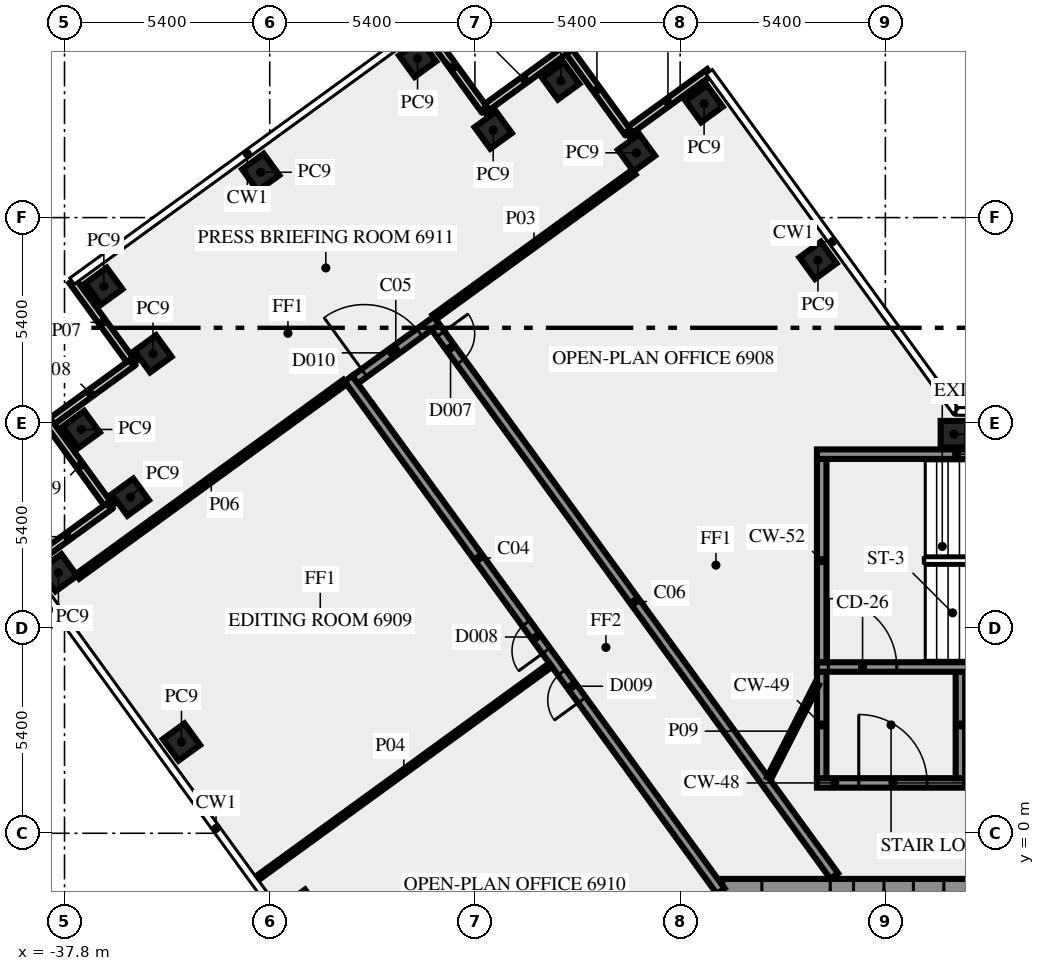
"""IFC4 building model, lengths in metres.
Left out: names, types, materials, properties, quantities, classifications, styles, units other than length and angle.
Written with IfcOpenShell. Run it as: python <this file> out.ifc"""

import sys

from ifc_helpers import new_model, si_unit, direction, frame, frame_2d, origin, origin_2d, place, context, subcontext, project, spatial, rectangle, extrude, element, fill, save


model = new_model("IFC4")
c1 = context("Model", 3, precision=1e-05, world=origin(), true_north=direction((0.0, 1.0)))
c2 = subcontext(c1, "Body", "Model", "MODEL_VIEW")
j1 = project(units=[si_unit("LENGTHUNIT", "METRE"), si_unit("PLANEANGLEUNIT", "RADIAN")], contexts=[c1])
p1 = place(None, origin())
s1 = spatial("IfcSite", under=j1, at=p1, CompositionType="ELEMENT")
p2 = place(p1, origin())
s2 = spatial("IfcBuilding", under=s1, at=p2, CompositionType="ELEMENT")
p3 = place(p2, frame((0.0, 0.0, 297.0)))
s3 = spatial("IfcBuildingStorey", under=s2, at=p3, CompositionType="ELEMENT", Elevation=297.0)
for number, where, z_axis, x_axis in (
    (1, (-17.974, 15.075, 0.0), (0.0, 0.0, 1.0), (-0.588, 0.809, 0.0)),
    (2, (-20.97, 19.195, 0.0), (0.0, 0.0, 1.0), (-0.588, 0.809, 0.0)),
    (3, (-22.749, 17.904, 0.0), (0.0, 0.0, 1.0), (-0.588, 0.809, 0.0)),
    (4, (-24.74, 19.795, 0.0), (0.0, 0.0, 1.0), (-0.588, 0.809, 0.0)),
    (5, (-26.519, 18.5, 0.0), (0.0, 0.0, 1.0), (-0.588, 0.809, 0.0)),
    (6, (-28.51, 20.39, 0.0), (0.0, 0.0, 1.0), (-0.809, -0.588, 0.0)),
    (7, (-32.637, 17.393, 0.0), (0.0, 0.0, 1.0), (-0.809, -0.588, 0.0)),
    (8, (-36.765, 14.395, 0.0), (0.0, 0.0, 1.0), (0.588, -0.809, 0.0)),
    (9, (-35.471, 12.616, 0.0), (0.0, 0.0, 1.0), (-0.809, -0.588, 0.0)),
    (10, (-37.36, 10.625, 0.0), (0.0, 0.0, 1.0), (0.588, -0.809, 0.0)),
    (11, (-36.068, 8.844, 0.0), (0.0, 0.0, 1.0), (0.588, -0.809, 0.0)),
    (12, (-37.96, 6.855, 0.0), (0.0, 0.0, 1.0), (0.588, -0.809, 0.0)),
    (13, (-34.722, 2.4, 0.0), (0.0, 0.0, 1.0), (0.588, -0.809, 0.0)),
    (14, (-31.548, -1.969, 0.0), (0.0, 0.0, 1.0), (0.588, -0.809, 0.0)),
    (15, (-14.395, 10.5, 0.0), (0.0, 0.0, 1.0), (-1.0, 0.0, 0.0)),
):
    element("IfcColumn", number, at=place(p3, frame(where, z_axis=z_axis, x_axis=x_axis)), inside=s3, PredefinedType="COLUMN", context=c2, shape_type="SweptSolid", body=[
        extrude(rectangle(XDim=0.7, YDim=0.7, at=origin_2d()), origin(), (0.0, 0.0, 1.0), 3.4),
    ])
for number, where, z_axis, x_axis in (
    (16, (-20.829, 20.025, 0.0), (0.0, 0.0, 1.0), (-0.809, -0.588, 0.0)),
    (17, (-22.996, 18.466, 0.0), (0.0, 0.0, 1.0), (-0.588, 0.809, 0.0)),
):
    element("IfcWall", number, at=place(p3, frame(where, z_axis=z_axis, x_axis=x_axis)), inside=s3, PredefinedType="SOLIDWALL", context=c2, shape_type="SweptSolid", body=[
        extrude(rectangle(XDim=2.7, YDim=0.2, at=frame_2d((1.35, 0.0))), origin(), (0.0, 0.0, 1.0), 3.4),
    ])
for number, where, z_axis, x_axis in (
    (18, (-24.6, 20.623, 0.0), (0.0, 0.0, 1.0), (-0.809, -0.588, 0.0)),
    (19, (-26.768, 19.063, 0.0), (0.0, 0.0, 1.0), (-0.588, 0.809, 0.0)),
):
    element("IfcWall", number, at=place(p3, frame(where, z_axis=z_axis, x_axis=x_axis)), inside=s3, PredefinedType="SOLIDWALL", context=c2, shape_type="SweptSolid", body=[
        extrude(rectangle(XDim=2.7, YDim=0.2, at=frame_2d((1.35, 0.0))), origin(), (0.0, 0.0, 1.0), 3.4),
    ])
for number, where, z_axis, x_axis in (
    (20, (-37.592, 14.536, 0.0), (0.0, 0.0, 1.0), (0.588, -0.809, 0.0)),
    (21, (-36.032, 12.369, 0.0), (0.0, 0.0, 1.0), (-0.809, -0.588, 0.0)),
    (22, (-38.189, 10.765, 0.0), (0.0, 0.0, 1.0), (0.588, -0.809, 0.0)),
    (23, (-36.629, 8.597, 0.0), (0.0, 0.0, 1.0), (-0.809, -0.588, 0.0)),
):
    element("IfcWall", number, at=place(p3, frame(where, z_axis=z_axis, x_axis=x_axis)), inside=s3, PredefinedType="SOLIDWALL", context=c2, shape_type="SweptSolid", body=[
        extrude(rectangle(XDim=2.7, YDim=0.2, at=frame_2d((1.35, 0.0))), origin(), (0.0, 0.0, 1.0), 3.4),
    ])
p4 = place(p3, frame((20.49, -1.45, 0.0), z_axis=(0.0, 0.0, 1.0), x_axis=(-1.0, 0.0, 0.0)))
e24 = element("IfcWall", 24, at=p4, inside=s3, PredefinedType="SHEAR", context=c2, shape_type="SweptSolid", body=[
    extrude(rectangle(XDim=40.98, YDim=0.5, at=frame_2d((20.49, 0.0))), origin(), (0.0, 0.0, 1.0), 3.4),
])
p5 = place(p4, frame((38.14, 0.0, 0.0)))
e25 = element("IfcOpeningElement", 25, at=p5, cuts=e24, PredefinedType="OPENING", context=c2, shape_type="SweptSolid", body=[
    extrude(rectangle(XDim=1.8, YDim=2.1, at=frame_2d((0.9, 1.05))), frame((0.0, 0.26, 0.0), z_axis=(0.0, -1.0, 0.0), x_axis=(1.0, 0.0, 0.0)), (0.0, 0.0, 1.0), 0.52),
])
p6 = place(p4, frame((36.728, 0.0, 0.0)))
e26 = element("IfcOpeningElement", 26, at=p6, cuts=e24, PredefinedType="OPENING", context=c2, shape_type="SweptSolid", body=[
    extrude(rectangle(XDim=0.8, YDim=2.1, at=frame_2d((0.4, 1.05))), frame((0.0, 0.26, 0.0), z_axis=(0.0, -1.0, 0.0), x_axis=(1.0, 0.0, 0.0)), (0.0, 0.0, 1.0), 0.52),
])
p7 = place(p4, frame((35.153, 0.0, 0.0)))
e27 = element("IfcOpeningElement", 27, at=p7, cuts=e24, PredefinedType="OPENING", context=c2, shape_type="SweptSolid", body=[
    extrude(rectangle(XDim=0.8, YDim=2.1, at=frame_2d((0.4, 1.05))), frame((0.0, 0.26, 0.0), z_axis=(0.0, -1.0, 0.0), x_axis=(1.0, 0.0, 0.0)), (0.0, 0.0, 1.0), 0.52),
])
p8 = place(p4, frame((32.94, 0.0, 0.0)))
e28 = element("IfcOpeningElement", 28, at=p8, cuts=e24, PredefinedType="OPENING", context=c2, shape_type="SweptSolid", body=[
    extrude(rectangle(XDim=0.9, YDim=2.1, at=frame_2d((0.45, 1.05))), frame((0.0, 0.26, 0.0), z_axis=(0.0, -1.0, 0.0), x_axis=(1.0, 0.0, 0.0)), (0.0, 0.0, 1.0), 0.52),
])
p9 = place(p4, frame((31.015, 0.0, 0.0)))
e29 = element("IfcOpeningElement", 29, at=p9, cuts=e24, PredefinedType="OPENING", context=c2, shape_type="SweptSolid", body=[
    extrude(rectangle(XDim=0.8, YDim=2.1, at=frame_2d((0.4, 1.05))), frame((0.0, 0.26, 0.0), z_axis=(0.0, -1.0, 0.0), x_axis=(1.0, 0.0, 0.0)), (0.0, 0.0, 1.0), 0.52),
])
p10 = place(p4, frame((24.765, 0.0, 0.0)))
e30 = element("IfcOpeningElement", 30, at=p10, cuts=e24, PredefinedType="OPENING", context=c2, shape_type="SweptSolid", body=[
    extrude(rectangle(XDim=0.8, YDim=2.1, at=frame_2d((0.4, 1.05))), frame((0.0, 0.26, 0.0), z_axis=(0.0, -1.0, 0.0), x_axis=(1.0, 0.0, 0.0)), (0.0, 0.0, 1.0), 0.52),
])
p11 = place(p4, frame((19.59, 0.0, 0.0)))
e31 = element("IfcOpeningElement", 31, at=p11, cuts=e24, PredefinedType="OPENING", context=c2, shape_type="SweptSolid", body=[
    extrude(rectangle(XDim=2.0, YDim=2.1, at=frame_2d((1.0, 1.05))), frame((0.0, 0.26, 0.0), z_axis=(0.0, -1.0, 0.0), x_axis=(1.0, 0.0, 0.0)), (0.0, 0.0, 1.0), 0.52),
])
p12 = place(p4, frame((14.202, 0.0, 0.0)))
e32 = element("IfcOpeningElement", 32, at=p12, cuts=e24, PredefinedType="OPENING", context=c2, shape_type="SweptSolid", body=[
    extrude(rectangle(XDim=0.9, YDim=2.1, at=frame_2d((0.45, 1.05))), frame((0.0, 0.26, 0.0), z_axis=(0.0, -1.0, 0.0), x_axis=(1.0, 0.0, 0.0)), (0.0, 0.0, 1.0), 0.52),
])
p13 = place(p4, frame((10.478, 0.0, 0.0)))
e33 = element("IfcOpeningElement", 33, at=p13, cuts=e24, PredefinedType="OPENING", context=c2, shape_type="SweptSolid", body=[
    extrude(rectangle(XDim=0.9, YDim=2.1, at=frame_2d((0.45, 1.05))), frame((0.0, 0.26, 0.0), z_axis=(0.0, -1.0, 0.0), x_axis=(1.0, 0.0, 0.0)), (0.0, 0.0, 1.0), 0.52),
])
p14 = place(p4, frame((7.14, 0.0, 0.0)))
e34 = element("IfcOpeningElement", 34, at=p14, cuts=e24, PredefinedType="OPENING", context=c2, shape_type="SweptSolid", body=[
    extrude(rectangle(XDim=0.9, YDim=2.1, at=frame_2d((0.45, 1.05))), frame((0.0, 0.26, 0.0), z_axis=(0.0, -1.0, 0.0), x_axis=(1.0, 0.0, 0.0)), (0.0, 0.0, 1.0), 0.52),
])
p15 = place(p4, frame((4.19, 0.0, 0.0)))
e35 = element("IfcOpeningElement", 35, at=p15, cuts=e24, PredefinedType="OPENING", context=c2, shape_type="SweptSolid", body=[
    extrude(rectangle(XDim=0.9, YDim=2.1, at=frame_2d((0.45, 1.05))), frame((0.0, 0.26, 0.0), z_axis=(0.0, -1.0, 0.0), x_axis=(1.0, 0.0, 0.0)), (0.0, 0.0, 1.0), 0.52),
])
p16 = place(p4, frame((1.04, 0.0, 0.0)))
e36 = element("IfcOpeningElement", 36, at=p16, cuts=e24, PredefinedType="OPENING", context=c2, shape_type="SweptSolid", body=[
    extrude(rectangle(XDim=1.8, YDim=2.1, at=frame_2d((0.9, 1.05))), frame((0.0, 0.26, 0.0), z_axis=(0.0, -1.0, 0.0), x_axis=(1.0, 0.0, 0.0)), (0.0, 0.0, 1.0), 0.52),
])
p17 = place(p3, frame((-18.0, 1.325, 0.0), z_axis=(0.0, 0.0, 1.0), x_axis=(1.0, 0.0, 0.0)))
e37 = element("IfcWall", 37, at=p17, inside=s3, PredefinedType="SHEAR", context=c2, shape_type="SweptSolid", body=[
    extrude(rectangle(XDim=3.9, YDim=0.25, at=frame_2d((1.95, 0.0))), origin(), (0.0, 0.0, 1.0), 3.4),
])
p18 = place(p17, frame((1.1, 0.0, 0.0)))
e38 = element("IfcOpeningElement", 38, at=p18, cuts=e37, PredefinedType="OPENING", context=c2, shape_type="SweptSolid", body=[
    extrude(rectangle(XDim=1.8, YDim=2.1, at=frame_2d((0.9, 1.05))), frame((0.0, 0.135, 0.0), z_axis=(0.0, -1.0, 0.0), x_axis=(1.0, 0.0, 0.0)), (0.0, 0.0, 1.0), 0.27),
])
for number, where, z_axis, x_axis in (
    (39, (-17.875, 1.45, 0.0), (0.0, 0.0, 1.0), (0.0, 1.0, 0.0)),
    (40, (-14.225, 1.45, 0.0), (0.0, 0.0, 1.0), (0.0, 1.0, 0.0)),
):
    element("IfcWall", number, at=place(p3, frame(where, z_axis=z_axis, x_axis=x_axis)), inside=s3, PredefinedType="SHEAR", context=c2, shape_type="SweptSolid", body=[
        extrude(rectangle(XDim=2.8, YDim=0.25, at=frame_2d((1.4, 0.0))), origin(), (0.0, 0.0, 1.0), 3.4),
    ])
p19 = place(p3, frame((-18.0, 4.375, 0.0), z_axis=(0.0, 0.0, 1.0), x_axis=(1.0, 0.0, 0.0)))
e41 = element("IfcWall", 41, at=p19, inside=s3, PredefinedType="SHEAR", context=c2, shape_type="SweptSolid", body=[
    extrude(rectangle(XDim=10.5, YDim=0.25, at=frame_2d((5.25, 0.0))), origin(), (0.0, 0.0, 1.0), 3.4),
])
p20 = place(p19, frame((0.3, 0.0, 0.0)))
e42 = element("IfcOpeningElement", 42, at=p20, cuts=e41, PredefinedType="OPENING", context=c2, shape_type="SweptSolid", body=[
    extrude(rectangle(XDim=1.8, YDim=2.1, at=frame_2d((0.9, 1.05))), frame((0.0, 0.135, 0.0), z_axis=(0.0, -1.0, 0.0), x_axis=(1.0, 0.0, 0.0)), (0.0, 0.0, 1.0), 0.27),
])
p21 = place(p3, frame((-17.875, 4.5, 0.0), z_axis=(0.0, 0.0, 1.0), x_axis=(0.0, 1.0, 0.0)))
e43 = element("IfcWall", 43, at=p21, inside=s3, PredefinedType="SHEAR", context=c2, shape_type="SweptSolid", body=[
    extrude(rectangle(XDim=5.35, YDim=0.25, at=frame_2d((2.675, 0.0))), origin(), (0.0, 0.0, 1.0), 3.4),
])
p22 = place(p3, frame((-18.0, 9.975, 0.0), z_axis=(0.0, 0.0, 1.0), x_axis=(1.0, 0.0, 0.0)))
e44 = element("IfcWall", 44, at=p22, inside=s3, PredefinedType="SHEAR", context=c2, shape_type="SweptSolid", body=[
    extrude(rectangle(XDim=10.5, YDim=0.25, at=frame_2d((5.25, 0.0))), origin(), (0.0, 0.0, 1.0), 3.4),
])
p23 = place(p22, frame((4.5, 0.0, 1.0)))
e45 = element("IfcOpeningElement", 45, at=p23, cuts=e44, PredefinedType="OPENING", context=c2, shape_type="SweptSolid", body=[
    extrude(rectangle(XDim=1.2, YDim=1.2, at=frame_2d((0.6, 0.6))), frame((0.0, 0.135, 0.0), z_axis=(0.0, -1.0, 0.0), x_axis=(1.0, 0.0, 0.0)), (0.0, 0.0, 1.0), 0.27),
])
p24 = place(p3, frame((-20.531, -1.523, 0.0), z_axis=(0.0, 0.0, 1.0), x_axis=(-0.587785867777, 0.809016547199, 0.0)))
e46 = element("IfcWall", 46, at=p24, inside=s3, PredefinedType="SOLIDWALL", context=c2, shape_type="SweptSolid", body=[
    extrude(rectangle(XDim=16.67, YDim=0.25, at=frame_2d((8.335, 0.0))), origin(), (0.0, 0.0, 1.0), 3.4),
])
p25 = place(p24, frame((6.216, 0.0, 0.0)))
e47 = element("IfcOpeningElement", 47, at=p25, cuts=e46, PredefinedType="OPENING", context=c2, shape_type="SweptSolid", body=[
    extrude(rectangle(XDim=0.9, YDim=2.1, at=frame_2d((0.45, 1.05))), frame((0.0, 0.135, 0.0), z_axis=(0.0, -1.0, 0.0), x_axis=(1.0, 0.0, 0.0)), (0.0, 0.0, 1.0), 0.27),
])
p26 = place(p24, frame((7.816, 0.0, 0.0)))
e48 = element("IfcOpeningElement", 48, at=p26, cuts=e46, PredefinedType="OPENING", context=c2, shape_type="SweptSolid", body=[
    extrude(rectangle(XDim=0.9, YDim=2.1, at=frame_2d((0.45, 1.05))), frame((0.0, 0.135, 0.0), z_axis=(0.0, -1.0, 0.0), x_axis=(1.0, 0.0, 0.0)), (0.0, 0.0, 1.0), 0.27),
])
p27 = place(p3, frame((-30.155, 11.936, 0.0), z_axis=(0.0, 0.0, 1.0), x_axis=(0.809038743598, 0.587755315891, 0.0)))
e49 = element("IfcWall", 49, at=p27, inside=s3, PredefinedType="SOLIDWALL", context=c2, shape_type="SweptSolid", body=[
    extrude(rectangle(XDim=2.65, YDim=0.25, at=frame_2d((1.325, 0.0))), origin(), (0.0, 0.0, 1.0), 3.4),
])
p28 = place(p27, frame((0.3, 0.0, 0.0)))
e50 = element("IfcOpeningElement", 50, at=p28, cuts=e49, PredefinedType="OPENING", context=c2, shape_type="SweptSolid", body=[
    extrude(rectangle(XDim=1.8, YDim=2.1, at=frame_2d((0.9, 1.05))), frame((0.0, 0.135, 0.0), z_axis=(0.0, -1.0, 0.0), x_axis=(1.0, 0.0, 0.0)), (0.0, 0.0, 1.0), 0.27),
])
p29 = place(p3, frame((-28.039, 13.319, 0.0), z_axis=(0.0, 0.0, 1.0), x_axis=(0.587791911753, -0.809012155952, 0.0)))
e51 = element("IfcWall", 51, at=p29, inside=s3, PredefinedType="SOLIDWALL", context=c2, shape_type="SweptSolid", body=[
    extrude(rectangle(XDim=17.853, YDim=0.25, at=frame_2d((8.927, 0.0))), origin(), (0.0, 0.0, 1.0), 3.4),
])
p30 = place(p29, frame((0.225, 0.0, 0.0)))
e52 = element("IfcOpeningElement", 52, at=p30, cuts=e51, PredefinedType="OPENING", context=c2, shape_type="SweptSolid", body=[
    extrude(rectangle(XDim=0.9, YDim=2.1, at=frame_2d((0.45, 1.05))), frame((0.0, 0.135, 0.0), z_axis=(0.0, -1.0, 0.0), x_axis=(1.0, 0.0, 0.0)), (0.0, 0.0, 1.0), 0.27),
])
p31 = place(p3, frame((-22.818, 17.396, 0.0), z_axis=(0.0, 0.0, 1.0), x_axis=(-0.809000932727, -0.587807358619, 0.0)))
e53 = element("IfcWall", 53, at=p31, inside=s3, PredefinedType="PARTITIONING", context=c2, shape_type="SweptSolid", body=[
    extrude(rectangle(XDim=6.496, YDim=0.15, at=frame_2d((3.248, 0.0))), origin(), (0.0, 0.0, 1.0), 3.4),
])
p32 = place(p3, frame((-25.008, 4.427, 0.0), z_axis=(0.0, 0.0, 1.0), x_axis=(-0.808994684961, -0.587815957341, 0.0)))
e54 = element("IfcWall", 54, at=p32, inside=s3, PredefinedType="PARTITIONING", context=c2, shape_type="SweptSolid", body=[
    extrude(rectangle(XDim=9.55, YDim=0.12, at=frame_2d((4.775, 0.0))), origin(), (0.0, 0.0, 1.0), 2.7),
])
p33 = place(p3, frame((-30.419, 11.874, 0.0), z_axis=(0.0, 0.0, 1.0), x_axis=(-0.809016295501, -0.587786214209, 0.0)))
e55 = element("IfcWall", 55, at=p33, inside=s3, PredefinedType="PARTITIONING", context=c2, shape_type="SweptSolid", body=[
    extrude(rectangle(XDim=8.7, YDim=0.15, at=frame_2d((4.35, 0.0))), origin(), (0.0, 0.0, 1.0), 3.4),
])
p34 = place(p3, frame((-19.261, 1.45, 0.0), z_axis=(0.0, 0.0, 1.0), x_axis=(0.453950796792, 0.891026752736, 0.0)))
e56 = element("IfcWall", 56, at=p34, inside=s3, PredefinedType="PARTITIONING", context=c2, shape_type="SweptSolid", body=[
    extrude(rectangle(XDim=2.778, YDim=0.12, at=frame_2d((1.389, 0.0))), origin(), (0.0, 0.0, 1.0), 3.4),
])
p35 = place(p5, origin())
e57 = element("IfcDoor", 57, at=p35, inside=s3, OperationType="DOUBLE_DOOR_SINGLE_SWING", PredefinedType="DOOR", context=c2, shape_type="SweptSolid", body=[
    extrude(rectangle(XDim=1.8, YDim=2.1, at=frame_2d((0.9, 1.05))), frame((0.0, 0.025, 0.0), z_axis=(0.0, -1.0, 0.0), x_axis=(1.0, 0.0, 0.0)), (0.0, 0.0, 1.0), 0.05),
])
fill(e25, e57)
p36 = place(p6, origin())
e58 = element("IfcDoor", 58, at=p36, inside=s3, OperationType="SINGLE_SWING_RIGHT", PredefinedType="DOOR", context=c2, shape_type="SweptSolid", body=[
    extrude(rectangle(XDim=0.8, YDim=2.1, at=frame_2d((0.4, 1.05))), frame((0.0, 0.025, 0.0), z_axis=(0.0, -1.0, 0.0), x_axis=(1.0, 0.0, 0.0)), (0.0, 0.0, 1.0), 0.05),
])
fill(e26, e58)
p37 = place(p7, origin())
e59 = element("IfcDoor", 59, at=p37, inside=s3, OperationType="SINGLE_SWING_RIGHT", PredefinedType="DOOR", context=c2, shape_type="SweptSolid", body=[
    extrude(rectangle(XDim=0.8, YDim=2.1, at=frame_2d((0.4, 1.05))), frame((0.0, 0.025, 0.0), z_axis=(0.0, -1.0, 0.0), x_axis=(1.0, 0.0, 0.0)), (0.0, 0.0, 1.0), 0.05),
])
fill(e27, e59)
p38 = place(p18, origin())
e60 = element("IfcDoor", 60, at=p38, inside=s3, OperationType="DOUBLE_DOOR_SINGLE_SWING", PredefinedType="DOOR", context=c2, shape_type="SweptSolid", body=[
    extrude(rectangle(XDim=1.8, YDim=2.1, at=frame_2d((0.9, 1.05))), frame((0.0, 0.025, 0.0), z_axis=(0.0, -1.0, 0.0), x_axis=(1.0, 0.0, 0.0)), (0.0, 0.0, 1.0), 0.05),
])
fill(e38, e60)
p39 = place(p20, origin())
e61 = element("IfcDoor", 61, at=p39, inside=s3, OperationType="DOUBLE_DOOR_SINGLE_SWING", PredefinedType="DOOR", context=c2, shape_type="SweptSolid", body=[
    extrude(rectangle(XDim=1.8, YDim=2.1, at=frame_2d((0.9, 1.05))), frame((0.0, 0.025, 0.0), z_axis=(0.0, -1.0, 0.0), x_axis=(1.0, 0.0, 0.0)), (0.0, 0.0, 1.0), 0.05),
])
fill(e42, e61)
p40 = place(p30, origin())
e62 = element("IfcDoor", 62, at=p40, inside=s3, OperationType="SINGLE_SWING_LEFT", PredefinedType="DOOR", context=c2, shape_type="SweptSolid", body=[
    extrude(rectangle(XDim=0.9, YDim=2.1, at=frame_2d((0.45, 1.05))), frame((0.0, 0.025, 0.0), z_axis=(0.0, -1.0, 0.0), x_axis=(1.0, 0.0, 0.0)), (0.0, 0.0, 1.0), 0.05),
])
fill(e52, e62)
p41 = place(p25, origin())
e63 = element("IfcDoor", 63, at=p41, inside=s3, OperationType="SINGLE_SWING_RIGHT", PredefinedType="DOOR", context=c2, shape_type="SweptSolid", body=[
    extrude(rectangle(XDim=0.9, YDim=2.1, at=frame_2d((0.45, 1.05))), frame((0.0, 0.025, 0.0), z_axis=(0.0, -1.0, 0.0), x_axis=(1.0, 0.0, 0.0)), (0.0, 0.0, 1.0), 0.05),
])
fill(e47, e63)
p42 = place(p26, origin())
e64 = element("IfcDoor", 64, at=p42, inside=s3, OperationType="SINGLE_SWING_LEFT", PredefinedType="DOOR", context=c2, shape_type="SweptSolid", body=[
    extrude(rectangle(XDim=0.9, YDim=2.1, at=frame_2d((0.45, 1.05))), frame((0.0, 0.025, 0.0), z_axis=(0.0, -1.0, 0.0), x_axis=(1.0, 0.0, 0.0)), (0.0, 0.0, 1.0), 0.05),
])
fill(e48, e64)
p43 = place(p28, origin())
e65 = element("IfcDoor", 65, at=p43, inside=s3, OperationType="DOUBLE_DOOR_SINGLE_SWING", PredefinedType="DOOR", context=c2, shape_type="SweptSolid", body=[
    extrude(rectangle(XDim=1.8, YDim=2.1, at=frame_2d((0.9, 1.05))), frame((0.0, 0.025, 0.0), z_axis=(0.0, -1.0, 0.0), x_axis=(1.0, 0.0, 0.0)), (0.0, 0.0, 1.0), 0.05),
])
fill(e50, e65)
save(model, sys.argv[1])
